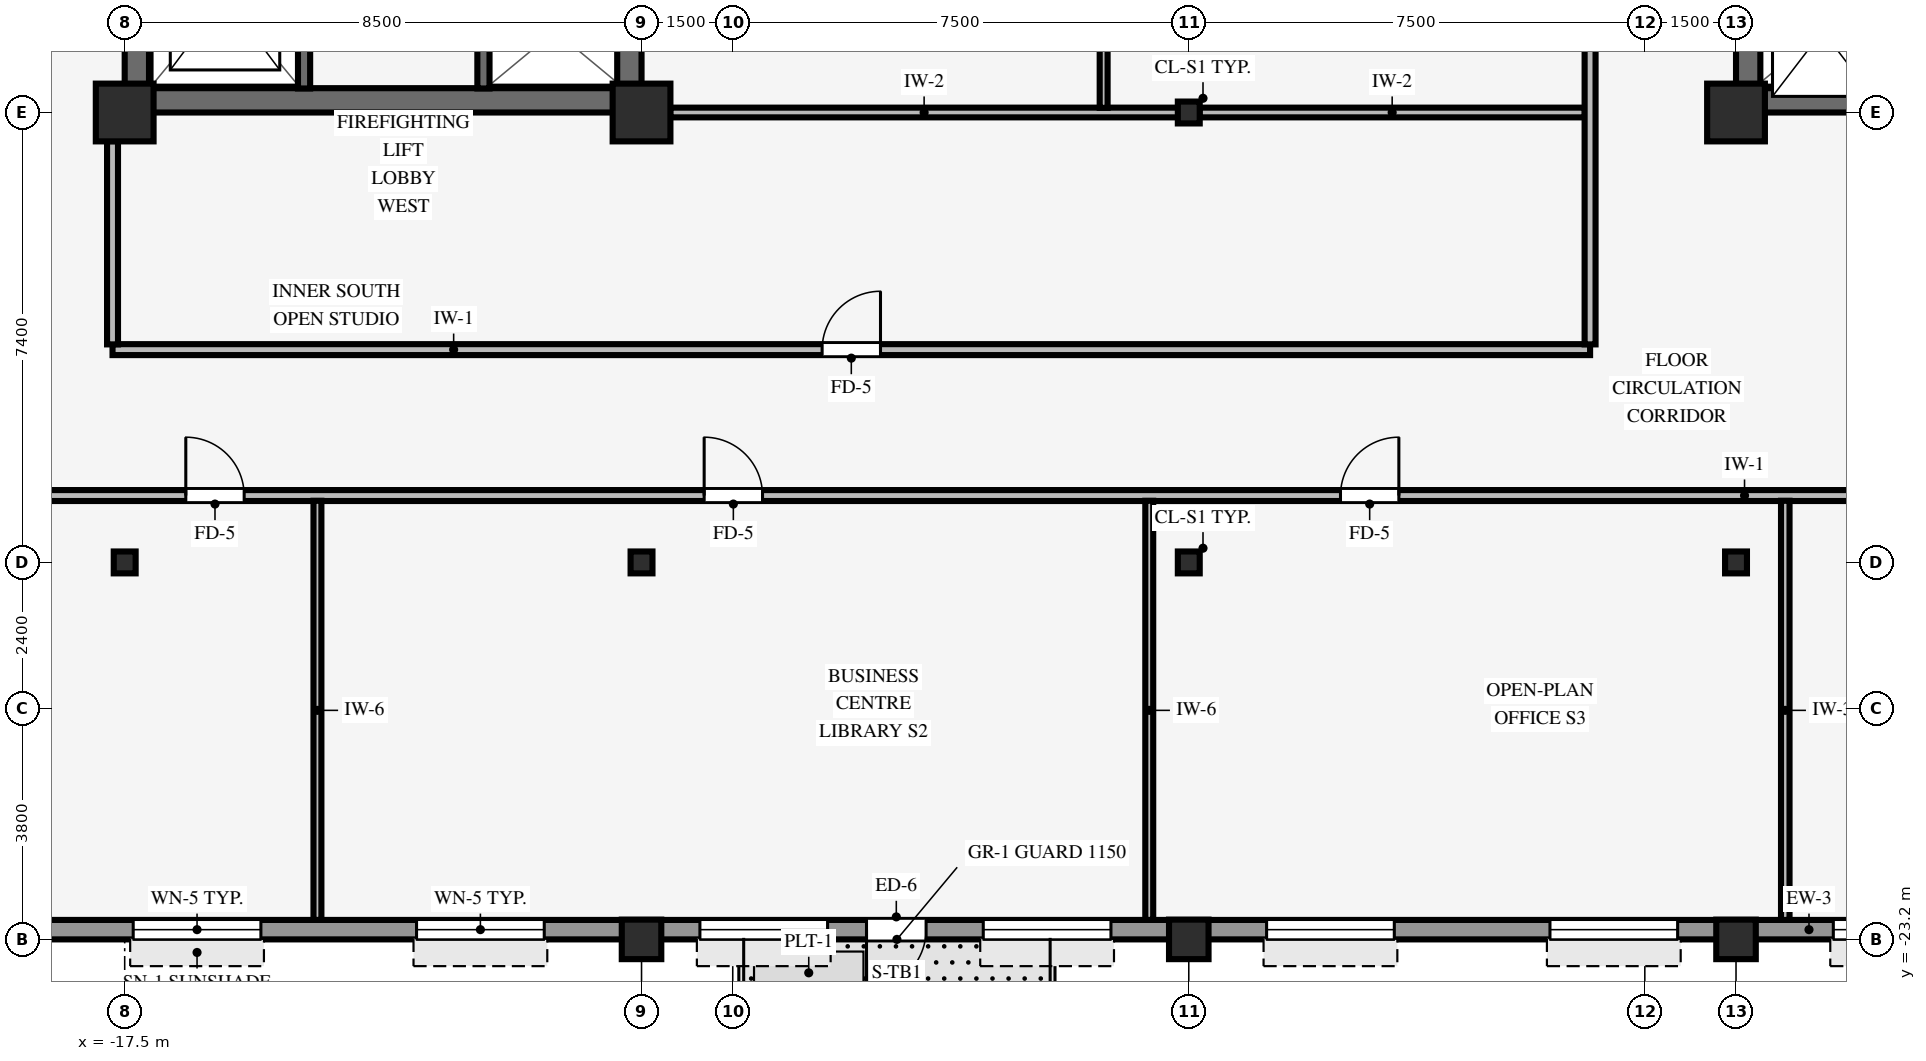
"""IFC4 building model, lengths in metres.
Left out: names, types, materials, properties, quantities, classifications, styles, units other than length and angle.
Written with IfcOpenShell. Run it as: python <this file> out.ifc"""

import sys

from ifc_helpers import new_model, si_unit, direction, frame, frame_2d, origin, origin_2d, place, context, subcontext, project, spatial, rectangle, hollow_rectangle, i_section, extrude, source, transform, mapped, element, fill, save


model = new_model("IFC4")
c1 = context("Model", 3, precision=1e-05, world=origin(), true_north=direction((0.0, 1.0)))
c2 = subcontext(c1, "Body", "Model", "MODEL_VIEW")
j1 = project(units=[si_unit("LENGTHUNIT", "METRE"), si_unit("PLANEANGLEUNIT", "RADIAN")], contexts=[c1])
p1 = place(None, origin())
s1 = spatial("IfcSite", under=j1, at=p1, CompositionType="ELEMENT")
p2 = place(p1, origin())
s2 = spatial("IfcBuilding", under=s1, at=p2, CompositionType="ELEMENT")
p3 = place(p2, frame((0.0, 0.0, 123.85)))
s3 = spatial("IfcBuildingStorey", under=s2, at=p3, CompositionType="ELEMENT", Elevation=123.85)
p4 = place(p3, frame((-17.5, -9.4, 0.0), z_axis=(0.0, 0.0, 1.0), x_axis=(1.0, 0.0, 0.0)))
e1 = element("IfcWall", 1, at=p4, inside=s3, PredefinedType="SHEAR", context=c2, shape_type="SweptSolid", body=[
    extrude(rectangle(XDim=8.5, YDim=0.4, at=frame_2d((4.25, 0.0))), origin(), (0.0, 0.0, 1.0), 3.37),
])
p5 = place(p3, frame((-17.3, -9.205, 0.0), z_axis=(0.0, 0.0, 1.0), x_axis=(0.0, 1.0, 0.0)))
e2 = element("IfcWall", 2, at=p5, inside=s3, PredefinedType="SHEAR", context=c2, shape_type="SweptSolid", body=[
    extrude(rectangle(XDim=18.41, YDim=0.4, at=frame_2d((9.205, 0.0))), origin(), (0.0, 0.0, 1.0), 3.37),
])
p6 = place(p3, frame((-9.2, -9.205, 0.0), z_axis=(0.0, 0.0, 1.0), x_axis=(0.0, 1.0, 0.0)))
e3 = element("IfcWall", 3, at=p6, inside=s3, PredefinedType="SHEAR", context=c2, shape_type="SweptSolid", body=[
    extrude(rectangle(XDim=18.41, YDim=0.4, at=frame_2d((9.205, 0.0))), origin(), (0.0, 0.0, 1.0), 3.37),
])
p7 = place(p6, frame((8.605, 0.0, 0.0)))
e4 = element("IfcOpeningElement", 4, at=p7, cuts=e3, PredefinedType="OPENING", context=c2, shape_type="SweptSolid", body=[
    extrude(rectangle(XDim=1.2, YDim=2.15, at=frame_2d((0.6, 1.075))), frame((0.0, 0.21, 0.0), z_axis=(0.0, -1.0, 0.0), x_axis=(1.0, 0.0, 0.0)), (0.0, 0.0, 1.0), 0.42),
])
p8 = place(p3, frame((9.0, -9.4, 0.0), z_axis=(0.0, 0.0, 1.0), x_axis=(1.0, 0.0, 0.0)))
e5 = element("IfcWall", 5, at=p8, inside=s3, PredefinedType="SHEAR", context=c2, shape_type="SweptSolid", body=[
    extrude(rectangle(XDim=8.5, YDim=0.4, at=frame_2d((4.25, 0.0))), origin(), (0.0, 0.0, 1.0), 3.37),
])
p9 = place(p3, frame((9.2, -9.205, 0.0), z_axis=(0.0, 0.0, 1.0), x_axis=(0.0, 1.0, 0.0)))
e6 = element("IfcWall", 6, at=p9, inside=s3, PredefinedType="SHEAR", context=c2, shape_type="SweptSolid", body=[
    extrude(rectangle(XDim=18.41, YDim=0.4, at=frame_2d((9.205, 0.0))), origin(), (0.0, 0.0, 1.0), 3.37),
])
p10 = place(p9, frame((8.605, 0.0, 0.0)))
e7 = element("IfcOpeningElement", 7, at=p10, cuts=e6, PredefinedType="OPENING", context=c2, shape_type="SweptSolid", body=[
    extrude(rectangle(XDim=1.2, YDim=2.15, at=frame_2d((0.6, 1.075))), frame((0.0, 0.21, 0.0), z_axis=(0.0, -1.0, 0.0), x_axis=(1.0, 0.0, 0.0)), (0.0, 0.0, 1.0), 0.42),
])
for number, where, z_axis, x_axis in (
    (8, (-17.5, -9.6, 0.0), (0.0, 0.0, 1.0), (1.0, 0.0, 0.0)),
    (9, (-9.0, -9.6, 0.0), (0.0, 0.0, 1.0), (1.0, 0.0, 0.0)),
    (10, (9.0, -9.6, 0.0), (0.0, 0.0, 1.0), (1.0, 0.0, 0.0)),
):
    element("IfcColumn", number, at=place(p3, frame(where, z_axis=z_axis, x_axis=x_axis)), inside=s3, PredefinedType="COLUMN", context=c2, shape_type="SweptSolid", body=[
        extrude(rectangle(XDim=0.95, YDim=0.95, at=origin_2d()), origin(), (0.0, 0.0, 1.0), 3.37),
    ])
for number, where, z_axis, x_axis in (
    (11, (-9.0, -23.2, 0.0), (0.0, 0.0, 1.0), (1.0, 0.0, 0.0)),
    (12, (0.0, -23.2, 0.0), (0.0, 0.0, 1.0), (1.0, 0.0, 0.0)),
    (13, (9.0, -23.2, 0.0), (0.0, 0.0, 1.0), (1.0, 0.0, 0.0)),
):
    element("IfcColumn", number, at=place(p3, frame(where, z_axis=z_axis, x_axis=x_axis)), inside=s3, PredefinedType="COLUMN", context=c2, shape_type="SweptSolid", body=[
        extrude(hollow_rectangle(XDim=0.65, YDim=0.65, WallThickness=0.04, InnerFilletRadius=0.04, OuterFilletRadius=0.08, at=origin_2d()), origin(), (0.0, 0.0, 1.0), 3.37),
    ])
for number, where, z_axis, x_axis in (
    (14, (0.0, -17.0, 0.0), (0.0, 0.0, 1.0), (1.0, 0.0, 0.0)),
    (15, (0.0, -9.6, 0.0), (0.0, 0.0, 1.0), (1.0, 0.0, 0.0)),
    (16, (-17.5, -17.0, 0.0), (0.0, 0.0, 1.0), (1.0, 0.0, 0.0)),
    (17, (-9.0, -17.0, 0.0), (0.0, 0.0, 1.0), (1.0, 0.0, 0.0)),
    (18, (9.0, -17.0, 0.0), (0.0, 0.0, 1.0), (1.0, 0.0, 0.0)),
):
    element("IfcColumn", number, at=place(p3, frame(where, z_axis=z_axis, x_axis=x_axis)), inside=s3, PredefinedType="COLUMN", context=c2, shape_type="SweptSolid", body=[
        extrude(i_section(OverallWidth=0.36, OverallDepth=0.36, WebThickness=0.021, FlangeThickness=0.021, FilletRadius=0.018, at=origin_2d()), origin(), (0.0, 0.0, 1.0), 3.37),
    ])
p11 = place(p3, frame((-24.3, -23.04, 0.0), z_axis=(0.0, 0.0, 1.0), x_axis=(1.0, 0.0, 0.0)))
e19 = element("IfcWall", 19, at=p11, inside=s3, PredefinedType="STANDARD", context=c2, shape_type="SweptSolid", body=[
    extrude(rectangle(XDim=48.6, YDim=0.32, at=frame_2d((24.3, 0.0))), origin(), (0.0, 0.0, 1.0), 2.705),
])
p12 = place(p11, frame((19.98, 0.0, 0.0), z_axis=(0.0, 0.0, 1.0), x_axis=(-1.0, 0.0, 0.0)))
e20 = element("IfcOpeningElement", 20, at=p12, cuts=e19, PredefinedType="OPENING", context=c2, shape_type="SweptSolid", body=[
    extrude(rectangle(XDim=0.98, YDim=2.15, at=frame_2d((0.49, 1.075))), frame((0.0, 0.17, 0.0), z_axis=(0.0, -1.0, 0.0), x_axis=(1.0, 0.0, 0.0)), (0.0, 0.0, 1.0), 0.34),
])
p13 = place(p11, frame((2.28, 0.0, 0.8)))
e21 = element("IfcOpeningElement", 21, at=p13, cuts=e19, PredefinedType="OPENING", context=c2, shape_type="SweptSolid", body=[
    extrude(rectangle(XDim=2.1, YDim=1.56, at=frame_2d((1.05, 0.78))), frame((0.0, 0.17, 0.0), z_axis=(0.0, -1.0, 0.0), x_axis=(1.0, 0.0, 0.0)), (0.0, 0.0, 1.0), 0.34),
])
p14 = place(p11, frame((6.94, 0.0, 0.8)))
e22 = element("IfcOpeningElement", 22, at=p14, cuts=e19, PredefinedType="OPENING", context=c2, shape_type="SweptSolid", body=[
    extrude(rectangle(XDim=2.1, YDim=1.56, at=frame_2d((1.05, 0.78))), frame((0.0, 0.17, 0.0), z_axis=(0.0, -1.0, 0.0), x_axis=(1.0, 0.0, 0.0)), (0.0, 0.0, 1.0), 0.34),
])
p15 = place(p11, frame((11.6, 0.0, 0.8)))
e23 = element("IfcOpeningElement", 23, at=p15, cuts=e19, PredefinedType="OPENING", context=c2, shape_type="SweptSolid", body=[
    extrude(rectangle(XDim=2.1, YDim=1.56, at=frame_2d((1.05, 0.78))), frame((0.0, 0.17, 0.0), z_axis=(0.0, -1.0, 0.0), x_axis=(1.0, 0.0, 0.0)), (0.0, 0.0, 1.0), 0.34),
])
p16 = place(p11, frame((16.26, 0.0, 0.8)))
e24 = element("IfcOpeningElement", 24, at=p16, cuts=e19, PredefinedType="OPENING", context=c2, shape_type="SweptSolid", body=[
    extrude(rectangle(XDim=2.1, YDim=1.56, at=frame_2d((1.05, 0.78))), frame((0.0, 0.17, 0.0), z_axis=(0.0, -1.0, 0.0), x_axis=(1.0, 0.0, 0.0)), (0.0, 0.0, 1.0), 0.34),
])
p17 = place(p11, frame((20.92, 0.0, 0.8)))
e25 = element("IfcOpeningElement", 25, at=p17, cuts=e19, PredefinedType="OPENING", context=c2, shape_type="SweptSolid", body=[
    extrude(rectangle(XDim=2.1, YDim=1.56, at=frame_2d((1.05, 0.78))), frame((0.0, 0.17, 0.0), z_axis=(0.0, -1.0, 0.0), x_axis=(1.0, 0.0, 0.0)), (0.0, 0.0, 1.0), 0.34),
])
p18 = place(p11, frame((25.58, 0.0, 0.8)))
e26 = element("IfcOpeningElement", 26, at=p18, cuts=e19, PredefinedType="OPENING", context=c2, shape_type="SweptSolid", body=[
    extrude(rectangle(XDim=2.1, YDim=1.56, at=frame_2d((1.05, 0.78))), frame((0.0, 0.17, 0.0), z_axis=(0.0, -1.0, 0.0), x_axis=(1.0, 0.0, 0.0)), (0.0, 0.0, 1.0), 0.34),
])
p19 = place(p11, frame((30.24, 0.0, 0.8)))
e27 = element("IfcOpeningElement", 27, at=p19, cuts=e19, PredefinedType="OPENING", context=c2, shape_type="SweptSolid", body=[
    extrude(rectangle(XDim=2.1, YDim=1.56, at=frame_2d((1.05, 0.78))), frame((0.0, 0.17, 0.0), z_axis=(0.0, -1.0, 0.0), x_axis=(1.0, 0.0, 0.0)), (0.0, 0.0, 1.0), 0.34),
])
p20 = place(p11, frame((34.9, 0.0, 0.8)))
e28 = element("IfcOpeningElement", 28, at=p20, cuts=e19, PredefinedType="OPENING", context=c2, shape_type="SweptSolid", body=[
    extrude(rectangle(XDim=2.1, YDim=1.56, at=frame_2d((1.05, 0.78))), frame((0.0, 0.17, 0.0), z_axis=(0.0, -1.0, 0.0), x_axis=(1.0, 0.0, 0.0)), (0.0, 0.0, 1.0), 0.34),
])
p21 = place(p11, frame((39.56, 0.0, 0.8)))
e29 = element("IfcOpeningElement", 29, at=p21, cuts=e19, PredefinedType="OPENING", context=c2, shape_type="SweptSolid", body=[
    extrude(rectangle(XDim=2.1, YDim=1.56, at=frame_2d((1.05, 0.78))), frame((0.0, 0.17, 0.0), z_axis=(0.0, -1.0, 0.0), x_axis=(1.0, 0.0, 0.0)), (0.0, 0.0, 1.0), 0.34),
])
p22 = place(p11, frame((44.22, 0.0, 0.8)))
e30 = element("IfcOpeningElement", 30, at=p22, cuts=e19, PredefinedType="OPENING", context=c2, shape_type="SweptSolid", body=[
    extrude(rectangle(XDim=2.1, YDim=1.56, at=frame_2d((1.05, 0.78))), frame((0.0, 0.17, 0.0), z_axis=(0.0, -1.0, 0.0), x_axis=(1.0, 0.0, 0.0)), (0.0, 0.0, 1.0), 0.34),
])
p23 = place(p3, frame((-14.55, -9.205, 0.0), z_axis=(0.0, 0.0, 1.0), x_axis=(0.0, 1.0, 0.0)))
e31 = element("IfcWall", 31, at=p23, inside=s3, PredefinedType="SHEAR", context=c2, shape_type="SweptSolid", body=[
    extrude(rectangle(XDim=3.01, YDim=0.2, at=frame_2d((1.505, 0.0))), origin(), (0.0, 0.0, 1.0), 3.37),
])
p24 = place(p23, frame((0.93, 0.0, 0.0)))
e32 = element("IfcOpeningElement", 32, at=p24, cuts=e31, PredefinedType="OPENING", context=c2, shape_type="SweptSolid", body=[
    extrude(rectangle(XDim=1.15, YDim=2.15, at=frame_2d((0.575, 1.075))), frame((0.0, 0.11, 0.0), z_axis=(0.0, -1.0, 0.0), x_axis=(1.0, 0.0, 0.0)), (0.0, 0.0, 1.0), 0.22),
])
p25 = place(p3, frame((-11.6, -9.205, 0.0), z_axis=(0.0, 0.0, 1.0), x_axis=(0.0, 1.0, 0.0)))
e33 = element("IfcWall", 33, at=p25, inside=s3, PredefinedType="SHEAR", context=c2, shape_type="SweptSolid", body=[
    extrude(rectangle(XDim=7.975, YDim=0.2, at=frame_2d((3.988, 0.0))), origin(), (0.0, 0.0, 1.0), 3.37),
])
p26 = place(p3, frame((-26.08, -15.9, 0.0), z_axis=(0.0, 0.0, 1.0), x_axis=(1.0, 0.0, 0.0)))
e34 = element("IfcWall", 34, at=p26, inside=s3, PredefinedType="PARTITIONING", context=c2, shape_type="SweptSolid", body=[
    extrude(rectangle(XDim=52.16, YDim=0.18, at=frame_2d((26.08, 0.0))), origin(), (0.0, 0.0, 1.0), 3.36),
])
p27 = place(p26, frame((18.11, 0.0, 0.0)))
e35 = element("IfcOpeningElement", 35, at=p27, cuts=e34, PredefinedType="OPENING", context=c2, shape_type="SweptSolid", body=[
    extrude(rectangle(XDim=0.96, YDim=2.1, at=frame_2d((0.48, 1.05))), frame((0.0, 0.1, 0.0), z_axis=(0.0, -1.0, 0.0), x_axis=(1.0, 0.0, 0.0)), (0.0, 0.0, 1.0), 0.2),
])
p28 = place(p26, frame((40.905, 0.0, 0.0)))
e36 = element("IfcOpeningElement", 36, at=p28, cuts=e34, PredefinedType="OPENING", context=c2, shape_type="SweptSolid", body=[
    extrude(rectangle(XDim=0.96, YDim=2.1, at=frame_2d((0.48, 1.05))), frame((0.0, 0.1, 0.0), z_axis=(0.0, -1.0, 0.0), x_axis=(1.0, 0.0, 0.0)), (0.0, 0.0, 1.0), 0.2),
])
p29 = place(p26, frame((28.575, 0.0, 0.0)))
e37 = element("IfcOpeningElement", 37, at=p29, cuts=e34, PredefinedType="OPENING", context=c2, shape_type="SweptSolid", body=[
    extrude(rectangle(XDim=0.96, YDim=2.1, at=frame_2d((0.48, 1.05))), frame((0.0, 0.1, 0.0), z_axis=(0.0, -1.0, 0.0), x_axis=(1.0, 0.0, 0.0)), (0.0, 0.0, 1.0), 0.2),
])
p30 = place(p26, frame((9.585, 0.0, 0.0)))
e38 = element("IfcOpeningElement", 38, at=p30, cuts=e34, PredefinedType="OPENING", context=c2, shape_type="SweptSolid", body=[
    extrude(rectangle(XDim=0.96, YDim=2.1, at=frame_2d((0.48, 1.05))), frame((0.0, 0.1, 0.0), z_axis=(0.0, -1.0, 0.0), x_axis=(1.0, 0.0, 0.0)), (0.0, 0.0, 1.0), 0.2),
])
p31 = place(p3, frame((-17.7, -13.5, 0.0), z_axis=(0.0, 0.0, 1.0), x_axis=(1.0, 0.0, 0.0)))
e39 = element("IfcWall", 39, at=p31, inside=s3, PredefinedType="PARTITIONING", context=c2, shape_type="SweptSolid", body=[
    extrude(rectangle(XDim=24.3, YDim=0.18, at=frame_2d((12.15, 0.0))), origin(), (0.0, 0.0, 1.0), 2.998),
])
p32 = place(p31, frame((11.67, 0.0, 0.0)))
e40 = element("IfcOpeningElement", 40, at=p32, cuts=e39, PredefinedType="OPENING", context=c2, shape_type="SweptSolid", body=[
    extrude(rectangle(XDim=0.96, YDim=2.1, at=frame_2d((0.48, 1.05))), frame((0.0, 0.1, 0.0), z_axis=(0.0, -1.0, 0.0), x_axis=(1.0, 0.0, 0.0)), (0.0, 0.0, 1.0), 0.2),
])
p33 = place(p3, frame((-8.529, -9.6, 0.0), z_axis=(0.0, 0.0, 1.0), x_axis=(1.0, 0.0, 0.0)))
e41 = element("IfcWall", 41, at=p33, inside=s3, PredefinedType="PARTITIONING", context=c2, shape_type="SweptSolid", body=[
    extrude(rectangle(XDim=8.353, YDim=0.16, at=frame_2d((4.177, 0.0))), origin(), (0.0, 0.0, 1.0), 2.405),
])
p34 = place(p3, frame((0.176, -9.6, 0.0), z_axis=(0.0, 0.0, 1.0), x_axis=(1.0, 0.0, 0.0)))
e42 = element("IfcWall", 42, at=p34, inside=s3, PredefinedType="PARTITIONING", context=c2, shape_type="SweptSolid", body=[
    extrude(rectangle(XDim=6.338, YDim=0.16, at=frame_2d((3.169, 0.0))), origin(), (0.0, 0.0, 1.0), 2.405),
])
p35 = place(p3, frame((-17.7, -13.414, 0.0), z_axis=(0.0, 0.0, 1.0), x_axis=(0.0, 1.0, 0.0)))
e43 = element("IfcWall", 43, at=p35, inside=s3, PredefinedType="PARTITIONING", context=c2, shape_type="SweptSolid", body=[
    extrude(rectangle(XDim=3.343, YDim=0.18, at=frame_2d((1.671, 0.0))), origin(), (0.0, 0.0, 1.0), 2.816),
])
p36 = place(p3, frame((-14.33, -22.88, 0.0), z_axis=(0.0, 0.0, 1.0), x_axis=(0.0, 1.0, 0.0)))
e44 = element("IfcWall", 44, at=p36, inside=s3, PredefinedType="PARTITIONING", context=c2, shape_type="SweptSolid", body=[
    extrude(rectangle(XDim=6.894, YDim=0.13, at=frame_2d((3.447, 0.0))), origin(), (0.0, 0.0, 1.0), 3.36),
])
p37 = place(p3, frame((-1.4, -9.524, 0.0), z_axis=(0.0, 0.0, 1.0), x_axis=(0.0, 1.0, 0.0)))
e45 = element("IfcWall", 45, at=p37, inside=s3, PredefinedType="PARTITIONING", context=c2, shape_type="SweptSolid", body=[
    extrude(rectangle(XDim=8.188, YDim=0.13, at=frame_2d((4.094, 0.0))), origin(), (0.0, 0.0, 1.0), 3.36),
])
p38 = place(p3, frame((-0.65, -22.88, 0.0), z_axis=(0.0, 0.0, 1.0), x_axis=(0.0, 1.0, 0.0)))
e46 = element("IfcWall", 46, at=p38, inside=s3, PredefinedType="PARTITIONING", context=c2, shape_type="SweptSolid", body=[
    extrude(rectangle(XDim=6.894, YDim=0.13, at=frame_2d((3.447, 0.0))), origin(), (0.0, 0.0, 1.0), 3.36),
])
p39 = place(p3, frame((6.6, -13.414, 0.0), z_axis=(0.0, 0.0, 1.0), x_axis=(0.0, 1.0, 0.0)))
e47 = element("IfcWall", 47, at=p39, inside=s3, PredefinedType="PARTITIONING", context=c2, shape_type="SweptSolid", body=[
    extrude(rectangle(XDim=12.078, YDim=0.18, at=frame_2d((6.039, 0.0))), origin(), (0.0, 0.0, 1.0), 3.36),
])
p40 = place(p39, frame((7.466, 0.0, 0.0)))
e48 = element("IfcOpeningElement", 48, at=p40, cuts=e47, PredefinedType="OPENING", context=c2, shape_type="SweptSolid", body=[
    extrude(rectangle(XDim=0.96, YDim=2.1, at=frame_2d((0.48, 1.05))), frame((0.0, 0.1, 0.0), z_axis=(0.0, -1.0, 0.0), x_axis=(1.0, 0.0, 0.0)), (0.0, 0.0, 1.0), 0.2),
])
p41 = place(p3, frame((9.81, -22.88, 0.0), z_axis=(0.0, 0.0, 1.0), x_axis=(0.0, 1.0, 0.0)))
e49 = element("IfcWall", 49, at=p41, inside=s3, PredefinedType="PARTITIONING", context=c2, shape_type="SweptSolid", body=[
    extrude(rectangle(XDim=6.894, YDim=0.14, at=frame_2d((3.447, 0.0))), origin(), (0.0, 0.0, 1.0), 3.36),
])
m1 = source(origin(), c2, "Body", "SweptSolid", [
    extrude(rectangle(XDim=0.98, YDim=2.15, at=frame_2d((0.49, 1.075))), frame((0.0, 0.025, 0.0), z_axis=(0.0, -1.0, 0.0), x_axis=(1.0, 0.0, 0.0)), (0.0, 0.0, 1.0), 0.05),
])
p42 = place(p12, origin())
e50 = element("IfcDoor", 50, at=p42, inside=s3, OperationType="SINGLE_SWING_RIGHT", PredefinedType="DOOR", context=c2, shape_type="MappedRepresentation", body=[
    mapped(m1, transform((0.0, 0.0, 0.0), scale=1.0)),
])
fill(e20, e50)
m2 = source(origin(), c2, "Body", "SweptSolid", [
    extrude(rectangle(XDim=2.1, YDim=1.56, at=frame_2d((1.05, 0.78))), frame((0.0, 0.03, 0.0), z_axis=(0.0, -1.0, 0.0), x_axis=(1.0, 0.0, 0.0)), (0.0, 0.0, 1.0), 0.06),
])
p43 = place(p14, origin())
e51 = element("IfcWindow", 51, at=p43, inside=s3, PartitioningType="SINGLE_PANEL", PredefinedType="WINDOW", context=c2, shape_type="MappedRepresentation", body=[
    mapped(m2, transform((0.0, 0.0, 0.0), scale=1.0)),
])
fill(e22, e51)
p44 = place(p15, origin())
e52 = element("IfcWindow", 52, at=p44, inside=s3, PartitioningType="SINGLE_PANEL", PredefinedType="WINDOW", context=c2, shape_type="MappedRepresentation", body=[
    mapped(m2, transform((0.0, 0.0, 0.0), scale=1.0)),
])
fill(e23, e52)
p45 = place(p16, origin())
e53 = element("IfcWindow", 53, at=p45, inside=s3, PartitioningType="SINGLE_PANEL", PredefinedType="WINDOW", context=c2, shape_type="MappedRepresentation", body=[
    mapped(m2, transform((0.0, 0.0, 0.0), scale=1.0)),
])
fill(e24, e53)
p46 = place(p17, origin())
e54 = element("IfcWindow", 54, at=p46, inside=s3, PartitioningType="SINGLE_PANEL", PredefinedType="WINDOW", context=c2, shape_type="MappedRepresentation", body=[
    mapped(m2, transform((0.0, 0.0, 0.0), scale=1.0)),
])
fill(e25, e54)
p47 = place(p18, origin())
e55 = element("IfcWindow", 55, at=p47, inside=s3, PartitioningType="SINGLE_PANEL", PredefinedType="WINDOW", context=c2, shape_type="MappedRepresentation", body=[
    mapped(m2, transform((0.0, 0.0, 0.0), scale=1.0)),
])
fill(e26, e55)
p48 = place(p19, origin())
e56 = element("IfcWindow", 56, at=p48, inside=s3, PartitioningType="SINGLE_PANEL", PredefinedType="WINDOW", context=c2, shape_type="MappedRepresentation", body=[
    mapped(m2, transform((0.0, 0.0, 0.0), scale=1.0)),
])
fill(e27, e56)
p49 = place(p20, origin())
e57 = element("IfcWindow", 57, at=p49, inside=s3, PartitioningType="SINGLE_PANEL", PredefinedType="WINDOW", context=c2, shape_type="MappedRepresentation", body=[
    mapped(m2, transform((0.0, 0.0, 0.0), scale=1.0)),
])
fill(e28, e57)
m3 = source(origin(), c2, "Body", "SweptSolid", [
    extrude(rectangle(XDim=0.96, YDim=2.1, at=frame_2d((0.48, 1.05))), frame((0.0, 0.025, 0.0), z_axis=(0.0, -1.0, 0.0), x_axis=(1.0, 0.0, 0.0)), (0.0, 0.0, 1.0), 0.05),
])
p50 = place(p32, origin())
e58 = element("IfcDoor", 58, at=p50, inside=s3, OperationType="SINGLE_SWING_RIGHT", PredefinedType="DOOR", context=c2, shape_type="MappedRepresentation", body=[
    mapped(m3, transform((0.0, 0.0, 0.0), scale=1.0)),
])
fill(e40, e58)
p51 = place(p27, origin())
e59 = element("IfcDoor", 59, at=p51, inside=s3, OperationType="SINGLE_SWING_LEFT", PredefinedType="DOOR", context=c2, shape_type="MappedRepresentation", body=[
    mapped(m3, transform((0.0, 0.0, 0.0), scale=1.0)),
])
fill(e35, e59)
p52 = place(p29, origin())
e60 = element("IfcDoor", 60, at=p52, inside=s3, OperationType="SINGLE_SWING_RIGHT", PredefinedType="DOOR", context=c2, shape_type="MappedRepresentation", body=[
    mapped(m3, transform((0.0, 0.0, 0.0), scale=1.0)),
])
fill(e37, e60)
p53 = place(p30, origin())
e61 = element("IfcDoor", 61, at=p53, inside=s3, OperationType="SINGLE_SWING_LEFT", PredefinedType="DOOR", context=c2, shape_type="MappedRepresentation", body=[
    mapped(m3, transform((0.0, 0.0, 0.0), scale=1.0)),
])
fill(e38, e61)
save(model, sys.argv[1])
